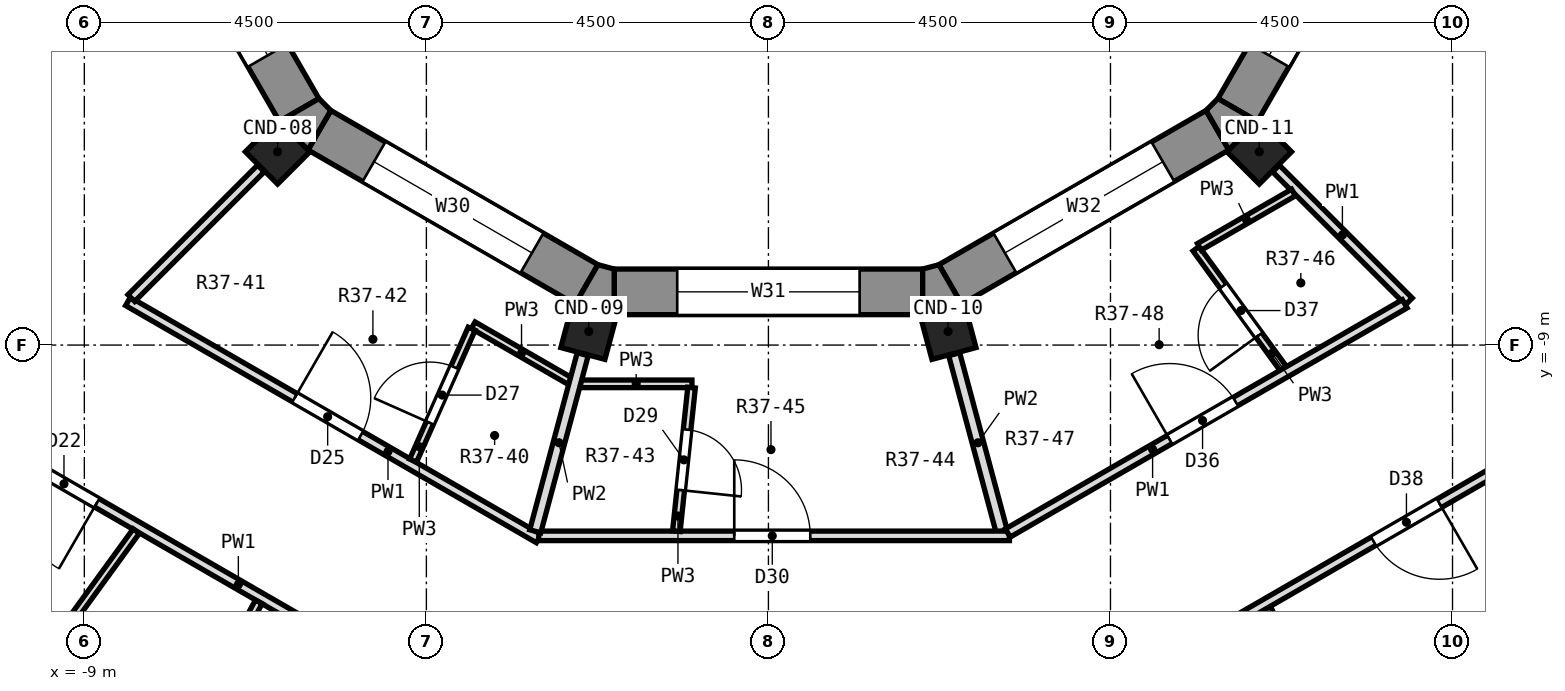
"""IFC4 building model, lengths in metres.
Left out: names, types, materials, properties, quantities, classifications, styles, units other than length and angle.
Written with IfcOpenShell. Run it as: python <this file> out.ifc"""

import sys

from ifc_helpers import new_model, si_unit, direction, frame, frame_2d, origin, origin_2d, place, context, subcontext, project, spatial, polyline, rectangle, outline, extrude, element, fill, save


model = new_model("IFC4")
c1 = context("Model", 3, precision=1e-05, world=origin(), true_north=direction((0.0, 1.0)))
c2 = subcontext(c1, "Body", "Model", "MODEL_VIEW")
j1 = project(units=[si_unit("LENGTHUNIT", "METRE"), si_unit("PLANEANGLEUNIT", "RADIAN")], contexts=[c1])
p1 = place(None, origin())
s1 = spatial("IfcSite", under=j1, at=p1, CompositionType="ELEMENT")
p2 = place(p1, origin())
s2 = spatial("IfcBuilding", under=s1, at=p2, CompositionType="ELEMENT")
p3 = place(p2, frame((0.0, 0.0, 269.3)))
s3 = spatial("IfcBuildingStorey", under=s2, at=p3, CompositionType="ELEMENT", Elevation=269.3)
for number, where, z_axis, x_axis in (
    (1, (-6.458, -6.458, 0.0), (0.0, 0.0, 1.0), (-0.707, -0.707, 0.0)),
    (2, (-2.364, -8.821, 0.0), (0.0, 0.0, 1.0), (-0.259, -0.966, 0.0)),
    (3, (2.364, -8.821, 0.0), (0.0, 0.0, 1.0), (0.259, -0.966, 0.0)),
    (4, (6.458, -6.458, 0.0), (0.0, 0.0, 1.0), (0.707, -0.707, 0.0)),
):
    element("IfcColumn", number, at=place(p3, frame(where, z_axis=z_axis, x_axis=x_axis)), inside=s3, PredefinedType="COLUMN", context=c2, shape_type="SweptSolid", body=[
        extrude(rectangle(XDim=0.6, YDim=0.6, at=origin_2d()), origin(), (0.0, 0.0, 1.0), 3.3),
    ])
p4 = place(p3, frame((-8.203, -2.393, 0.0), z_axis=(0.0, 0.0, 1.0), x_axis=(0.499994954979, -0.866028316509, 0.0)))
e5 = element("IfcWall", 5, at=p4, inside=s3, PredefinedType="SOLIDWALL", context=c2, shape_type="SweptSolid", body=[
    extrude(rectangle(XDim=4.059, YDim=0.6, at=frame_2d((2.029, 0.0))), origin(), (0.0, 0.0, 1.0), 2.9),
])
p5 = place(p4, frame((0.829, 0.0, 0.9)))
e6 = element("IfcOpeningElement", 6, at=p5, cuts=e5, PredefinedType="OPENING", context=c2, shape_type="SweptSolid", body=[
    extrude(rectangle(XDim=2.4, YDim=1.8, at=frame_2d((1.2, 0.9))), frame((0.0, 0.312, 0.0), z_axis=(0.0, -1.0, 0.0), x_axis=(1.0, 0.0, 0.0)), (0.0, 0.0, 1.0), 0.624),
])
p6 = place(p3, frame((-5.907, -6.173, 0.0), z_axis=(0.0, 0.0, 1.0), x_axis=(0.866028316509, -0.499994954979, 0.0)))
e7 = element("IfcWall", 7, at=p6, inside=s3, PredefinedType="SOLIDWALL", context=c2, shape_type="SweptSolid", body=[
    extrude(rectangle(XDim=4.059, YDim=0.6, at=frame_2d((2.029, 0.0))), origin(), (0.0, 0.0, 1.0), 2.9),
])
p7 = place(p6, frame((0.829, 0.0, 0.9)))
e8 = element("IfcOpeningElement", 8, at=p7, cuts=e7, PredefinedType="OPENING", context=c2, shape_type="SweptSolid", body=[
    extrude(rectangle(XDim=2.4, YDim=1.8, at=frame_2d((1.2, 0.9))), frame((0.0, 0.312, 0.0), z_axis=(0.0, -1.0, 0.0), x_axis=(1.0, 0.0, 0.0)), (0.0, 0.0, 1.0), 0.624),
])
p8 = place(p3, frame((-2.029, -8.3, 0.0), z_axis=(0.0, 0.0, 1.0), x_axis=(1.0, 0.0, 0.0)))
e9 = element("IfcWall", 9, at=p8, inside=s3, PredefinedType="SOLIDWALL", context=c2, shape_type="SweptSolid", body=[
    extrude(rectangle(XDim=4.059, YDim=0.6, at=frame_2d((2.029, 0.0))), origin(), (0.0, 0.0, 1.0), 2.9),
])
p9 = place(p8, frame((0.829, 0.0, 0.9)))
e10 = element("IfcOpeningElement", 10, at=p9, cuts=e9, PredefinedType="OPENING", context=c2, shape_type="SweptSolid", body=[
    extrude(rectangle(XDim=2.4, YDim=1.8, at=frame_2d((1.2, 0.9))), frame((0.0, 0.312, 0.0), z_axis=(0.0, -1.0, 0.0), x_axis=(1.0, 0.0, 0.0)), (0.0, 0.0, 1.0), 0.624),
])
p10 = place(p3, frame((2.393, -8.203, 0.0), z_axis=(0.0, 0.0, 1.0), x_axis=(0.866028316509, 0.499994954979, 0.0)))
e11 = element("IfcWall", 11, at=p10, inside=s3, PredefinedType="SOLIDWALL", context=c2, shape_type="SweptSolid", body=[
    extrude(rectangle(XDim=4.059, YDim=0.6, at=frame_2d((2.029, 0.0))), origin(), (0.0, 0.0, 1.0), 2.9),
])
p11 = place(p10, frame((0.829, 0.0, 0.9)))
e12 = element("IfcOpeningElement", 12, at=p11, cuts=e11, PredefinedType="OPENING", context=c2, shape_type="SweptSolid", body=[
    extrude(rectangle(XDim=2.4, YDim=1.8, at=frame_2d((1.2, 0.9))), frame((0.0, 0.312, 0.0), z_axis=(0.0, -1.0, 0.0), x_axis=(1.0, 0.0, 0.0)), (0.0, 0.0, 1.0), 0.624),
])
p12 = place(p3, frame((6.173, -5.907, 0.0), z_axis=(0.0, 0.0, 1.0), x_axis=(0.499994954979, 0.866028316509, 0.0)))
e13 = element("IfcWall", 13, at=p12, inside=s3, PredefinedType="SOLIDWALL", context=c2, shape_type="SweptSolid", body=[
    extrude(rectangle(XDim=4.059, YDim=0.6, at=frame_2d((2.029, 0.0))), origin(), (0.0, 0.0, 1.0), 2.9),
])
p13 = place(p12, frame((0.829, 0.0, 0.9)))
e14 = element("IfcOpeningElement", 14, at=p13, cuts=e13, PredefinedType="OPENING", context=c2, shape_type="SweptSolid", body=[
    extrude(rectangle(XDim=2.4, YDim=1.8, at=frame_2d((1.2, 0.9))), frame((0.0, 0.312, 0.0), z_axis=(0.0, -1.0, 0.0), x_axis=(1.0, 0.0, 0.0)), (0.0, 0.0, 1.0), 0.624),
])
p14 = place(p3, origin())
e15 = element("IfcWall", 15, at=p14, inside=s3, PredefinedType="SOLIDWALL", context=c2, shape_type="SweptSolid", body=[
    extrude(outline(polyline([(-6.058, -6.433), (-5.758, -5.914), (-5.914, -5.758), (-6.433, -6.058), (-6.058, -6.433)])), origin(), (0.0, 0.0, 1.0), 2.9),
])
p15 = place(p3, origin())
e16 = element("IfcWall", 16, at=p15, inside=s3, PredefinedType="SOLIDWALL", context=c2, shape_type="SweptSolid", body=[
    extrude(outline(polyline([(-2.029, -8.6), (-2.029, -8.0), (-2.242, -7.943), (-2.542, -8.462), (-2.029, -8.6)])), origin(), (0.0, 0.0, 1.0), 2.9),
])
p16 = place(p3, origin())
e17 = element("IfcWall", 17, at=p16, inside=s3, PredefinedType="SOLIDWALL", context=c2, shape_type="SweptSolid", body=[
    extrude(outline(polyline([(2.542, -8.462), (2.242, -7.943), (2.029, -8.0), (2.029, -8.6), (2.542, -8.462)])), origin(), (0.0, 0.0, 1.0), 2.9),
])
p17 = place(p3, origin())
e18 = element("IfcWall", 18, at=p17, inside=s3, PredefinedType="SOLIDWALL", context=c2, shape_type="SweptSolid", body=[
    extrude(outline(polyline([(6.433, -6.058), (5.914, -5.758), (5.758, -5.914), (6.058, -6.433), (6.433, -6.058)])), origin(), (0.0, 0.0, 1.0), 2.9),
])
p18 = place(p3, frame((2.444, -9.12, 0.0), z_axis=(0.0, 0.0, 1.0), x_axis=(0.258891282715, -0.965906467384, 0.0)))
e19 = element("IfcWall", 19, at=p18, inside=s3, PredefinedType="PARTITIONING", context=c2, shape_type="SweptSolid", body=[
    extrude(rectangle(XDim=2.411, YDim=0.15, at=frame_2d((1.206, 0.0))), origin(), (0.0, 0.0, 1.0), 2.9),
])
p19 = place(p3, frame((6.559, -12.462, 0.0), z_axis=(0.0, 0.0, 1.0), x_axis=(0.465716796336, -0.884933819904, 0.0)))
e20 = element("IfcWall", 20, at=p19, inside=s3, PredefinedType="PARTITIONING", context=c2, shape_type="SweptSolid", body=[
    extrude(rectangle(XDim=2.037, YDim=0.1, at=frame_2d((1.019, 0.0))), origin(), (0.0, 0.0, 1.0), 2.9),
])
p20 = place(p3, frame((5.626, -7.733, 0.0), z_axis=(0.0, 0.0, 1.0), x_axis=(0.588655753786, -0.808383821915, 0.0)))
e21 = element("IfcWall", 21, at=p20, inside=s3, PredefinedType="PARTITIONING", context=c2, shape_type="SweptSolid", body=[
    extrude(rectangle(XDim=1.949, YDim=0.1, at=frame_2d((0.975, 0.0))), origin(), (0.0, 0.0, 1.0), 2.9),
])
p21 = place(p20, frame((0.606, 0.0, 0.0)))
e22 = element("IfcOpeningElement", 22, at=p21, cuts=e21, PredefinedType="OPENING", context=c2, shape_type="SweptSolid", body=[
    extrude(rectangle(XDim=0.8, YDim=2.1, at=frame_2d((0.4, 1.05))), frame((0.0, 0.062, 0.0), z_axis=(0.0, -1.0, 0.0), x_axis=(1.0, 0.0, 0.0)), (0.0, 0.0, 1.0), 0.124),
])
p22 = place(p3, frame((6.677, -6.677, 0.0), z_axis=(0.0, 0.0, 1.0), x_axis=(0.707106781187, -0.707106781187, 0.0)))
e23 = element("IfcWall", 23, at=p22, inside=s3, PredefinedType="PARTITIONING", context=c2, shape_type="SweptSolid", body=[
    extrude(rectangle(XDim=2.474, YDim=0.125, at=frame_2d((1.237, 0.0))), origin(), (0.0, 0.0, 1.0), 2.9),
])
p23 = place(p3, frame((-10.256, -10.256, 0.0), z_axis=(0.0, 0.0, 1.0), x_axis=(0.866032740159, -0.499987292811, 0.0)))
e24 = element("IfcWall", 24, at=p23, inside=s3, PredefinedType="PARTITIONING", context=c2, shape_type="SweptSolid", body=[
    extrude(rectangle(XDim=7.581, YDim=0.125, at=frame_2d((3.791, 0.0))), origin(), (0.0, 0.0, 1.0), 2.9),
])
p24 = place(p23, frame((0.641, 0.0, 0.0)))
e25 = element("IfcOpeningElement", 25, at=p24, cuts=e24, PredefinedType="OPENING", context=c2, shape_type="SweptSolid", body=[
    extrude(rectangle(XDim=1.0, YDim=2.1, at=frame_2d((0.5, 1.05))), frame((0.0, 0.074, 0.0), z_axis=(0.0, -1.0, 0.0), x_axis=(1.0, 0.0, 0.0)), (0.0, 0.0, 1.0), 0.149),
])
p25 = place(p3, frame((-8.426, -8.426, 0.0), z_axis=(0.0, 0.0, 1.0), x_axis=(0.866039004929, -0.499976441387, 0.0)))
e26 = element("IfcWall", 26, at=p25, inside=s3, PredefinedType="PARTITIONING", context=c2, shape_type="SweptSolid", body=[
    extrude(rectangle(XDim=6.24, YDim=0.125, at=frame_2d((3.12, 0.0))), origin(), (0.0, 0.0, 1.0), 2.9),
])
p26 = place(p25, frame((2.534, 0.0, 0.0)))
e27 = element("IfcOpeningElement", 27, at=p26, cuts=e26, PredefinedType="OPENING", context=c2, shape_type="SweptSolid", body=[
    extrude(rectangle(XDim=1.0, YDim=2.1, at=frame_2d((0.5, 1.05))), frame((0.0, 0.074, 0.0), z_axis=(0.0, -1.0, 0.0), x_axis=(1.0, 0.0, 0.0)), (0.0, 0.0, 1.0), 0.149),
])
p27 = place(p3, frame((-3.884, -8.739, 0.0), z_axis=(0.0, 0.0, 1.0), x_axis=(0.866146805758, -0.499789666634, 0.0)))
e28 = element("IfcWall", 28, at=p27, inside=s3, PredefinedType="PARTITIONING", context=c2, shape_type="SweptSolid", body=[
    extrude(rectangle(XDim=1.468, YDim=0.1, at=frame_2d((0.734, 0.0))), origin(), (0.0, 0.0, 1.0), 2.9),
])
p28 = place(p3, frame((-3.021, -11.51, 0.0), z_axis=(0.0, 0.0, 1.0), x_axis=(1.0, 0.0, 0.0)))
e29 = element("IfcWall", 29, at=p28, inside=s3, PredefinedType="PARTITIONING", context=c2, shape_type="SweptSolid", body=[
    extrude(rectangle(XDim=6.192, YDim=0.125, at=frame_2d((3.096, 0.0))), origin(), (0.0, 0.0, 1.0), 2.9),
])
p29 = place(p28, frame((2.572, 0.0, 0.0)))
e30 = element("IfcOpeningElement", 30, at=p29, cuts=e29, PredefinedType="OPENING", context=c2, shape_type="SweptSolid", body=[
    extrude(rectangle(XDim=1.0, YDim=2.1, at=frame_2d((0.5, 1.05))), frame((0.0, 0.074, 0.0), z_axis=(0.0, -1.0, 0.0), x_axis=(1.0, 0.0, 0.0)), (0.0, 0.0, 1.0), 0.149),
])
p30 = place(p3, frame((-2.473, -9.51, 0.0), z_axis=(0.0, 0.0, 1.0), x_axis=(1.0, 0.0, 0.0)))
e31 = element("IfcWall", 31, at=p30, inside=s3, PredefinedType="PARTITIONING", context=c2, shape_type="SweptSolid", body=[
    extrude(rectangle(XDim=1.467, YDim=0.1, at=frame_2d((0.733, 0.0))), origin(), (0.0, 0.0, 1.0), 2.9),
])
p31 = place(p3, frame((3.808, -13.979, 0.0), z_axis=(0.0, 0.0, 1.0), x_axis=(0.866028642731, 0.499994389938, 0.0)))
e32 = element("IfcWall", 32, at=p31, inside=s3, PredefinedType="PARTITIONING", context=c2, shape_type="SweptSolid", body=[
    extrude(rectangle(XDim=7.383, YDim=0.125, at=frame_2d((3.691, 0.0))), origin(), (0.0, 0.0, 1.0), 2.9),
])
p32 = place(p31, frame((4.795, 0.0, 0.0)))
e33 = element("IfcOpeningElement", 33, at=p32, cuts=e32, PredefinedType="OPENING", context=c2, shape_type="SweptSolid", body=[
    extrude(rectangle(XDim=1.0, YDim=2.1, at=frame_2d((0.5, 1.05))), frame((0.0, 0.074, 0.0), z_axis=(0.0, -1.0, 0.0), x_axis=(1.0, 0.0, 0.0)), (0.0, 0.0, 1.0), 0.149),
])
p33 = place(p3, frame((3.149, -11.472, 0.0), z_axis=(0.0, 0.0, 1.0), x_axis=(0.866047390407, 0.499961916119, 0.0)))
e34 = element("IfcWall", 34, at=p33, inside=s3, PredefinedType="PARTITIONING", context=c2, shape_type="SweptSolid", body=[
    extrude(rectangle(XDim=6.031, YDim=0.125, at=frame_2d((3.015, 0.0))), origin(), (0.0, 0.0, 1.0), 2.9),
])
p34 = place(p33, frame((2.459, 0.0, 0.0)))
e35 = element("IfcOpeningElement", 35, at=p34, cuts=e34, PredefinedType="OPENING", context=c2, shape_type="SweptSolid", body=[
    extrude(rectangle(XDim=1.0, YDim=2.1, at=frame_2d((0.5, 1.05))), frame((0.0, 0.074, 0.0), z_axis=(0.0, -1.0, 0.0), x_axis=(1.0, 0.0, 0.0)), (0.0, 0.0, 1.0), 0.149),
])
p35 = place(p3, frame((5.669, -7.708, 0.0), z_axis=(0.0, 0.0, 1.0), x_axis=(0.866134428192, 0.499811116623, 0.0)))
e36 = element("IfcWall", 36, at=p35, inside=s3, PredefinedType="PARTITIONING", context=c2, shape_type="SweptSolid", body=[
    extrude(rectangle(XDim=1.43, YDim=0.1, at=frame_2d((0.715, 0.0))), origin(), (0.0, 0.0, 1.0), 2.9),
])
p36 = place(p3, frame((-8.382, -8.382, 0.0), z_axis=(0.0, 0.0, 1.0), x_axis=(0.707106781187, 0.707106781187, 0.0)))
e37 = element("IfcWall", 37, at=p36, inside=s3, PredefinedType="PARTITIONING", context=c2, shape_type="SweptSolid", body=[
    extrude(rectangle(XDim=2.411, YDim=0.125, at=frame_2d((1.206, 0.0))), origin(), (0.0, 0.0, 1.0), 2.9),
])
p37 = place(p3, frame((-9.492, -13.064, 0.0), z_axis=(0.0, 0.0, 1.0), x_axis=(0.587873893167, 0.80895258559, 0.0)))
e38 = element("IfcWall", 38, at=p37, inside=s3, PredefinedType="PARTITIONING", context=c2, shape_type="SweptSolid", body=[
    extrude(rectangle(XDim=1.999, YDim=0.1, at=frame_2d((1.0, 0.0))), origin(), (0.0, 0.0, 1.0), 2.9),
])
p38 = place(p3, frame((-7.652, -14.127, 0.0), z_axis=(0.0, 0.0, 1.0), x_axis=(0.476243596433, 0.879313389444, 0.0)))
e39 = element("IfcWall", 39, at=p38, inside=s3, PredefinedType="PARTITIONING", context=c2, shape_type="SweptSolid", body=[
    extrude(rectangle(XDim=1.989, YDim=0.1, at=frame_2d((0.994, 0.0))), origin(), (0.0, 0.0, 1.0), 2.9),
])
p39 = place(p3, frame((-4.675, -10.52, 0.0), z_axis=(0.0, 0.0, 1.0), x_axis=(0.40574466239, 0.913986470875, 0.0)))
e40 = element("IfcWall", 40, at=p39, inside=s3, PredefinedType="PARTITIONING", context=c2, shape_type="SweptSolid", body=[
    extrude(rectangle(XDim=1.898, YDim=0.1, at=frame_2d((0.949, 0.0))), origin(), (0.0, 0.0, 1.0), 2.9),
])
p40 = place(p39, frame((0.543, 0.0, 0.0)))
e41 = element("IfcOpeningElement", 41, at=p40, cuts=e40, PredefinedType="OPENING", context=c2, shape_type="SweptSolid", body=[
    extrude(rectangle(XDim=0.8, YDim=2.1, at=frame_2d((0.4, 1.05))), frame((0.0, 0.062, 0.0), z_axis=(0.0, -1.0, 0.0), x_axis=(1.0, 0.0, 0.0)), (0.0, 0.0, 1.0), 0.124),
])
p41 = place(p3, frame((-3.068, -11.45, 0.0), z_axis=(0.0, 0.0, 1.0), x_axis=(0.258796817064, 0.965931782, 0.0)))
e42 = element("IfcWall", 42, at=p41, inside=s3, PredefinedType="PARTITIONING", context=c2, shape_type="SweptSolid", body=[
    extrude(rectangle(XDim=2.411, YDim=0.15, at=frame_2d((1.206, 0.0))), origin(), (0.0, 0.0, 1.0), 2.9),
])
p42 = place(p3, frame((-1.211, -11.448, 0.0), z_axis=(0.0, 0.0, 1.0), x_axis=(0.105447867905, 0.99442483233, 0.0)))
e43 = element("IfcWall", 43, at=p42, inside=s3, PredefinedType="PARTITIONING", context=c2, shape_type="SweptSolid", body=[
    extrude(rectangle(XDim=1.898, YDim=0.1, at=frame_2d((0.949, 0.0))), origin(), (0.0, 0.0, 1.0), 2.9),
])
p43 = place(p42, frame((0.543, 0.0, 0.0)))
e44 = element("IfcOpeningElement", 44, at=p43, cuts=e43, PredefinedType="OPENING", context=c2, shape_type="SweptSolid", body=[
    extrude(rectangle(XDim=0.8, YDim=2.1, at=frame_2d((0.4, 1.05))), frame((0.0, 0.062, 0.0), z_axis=(0.0, -1.0, 0.0), x_axis=(1.0, 0.0, 0.0)), (0.0, 0.0, 1.0), 0.124),
])
p44 = place(p5, origin())
e45 = element("IfcWindow", 45, at=p44, inside=s3, PartitioningType="SINGLE_PANEL", PredefinedType="WINDOW", context=c2, shape_type="SweptSolid", body=[
    extrude(rectangle(XDim=2.4, YDim=1.8, at=frame_2d((1.2, 0.9))), frame((0.0, -0.12, 0.0), z_axis=(0.0, -1.0, 0.0), x_axis=(1.0, 0.0, 0.0)), (0.0, 0.0, 1.0), 0.06),
])
fill(e6, e45)
p45 = place(p7, origin())
e46 = element("IfcWindow", 46, at=p45, inside=s3, PartitioningType="SINGLE_PANEL", PredefinedType="WINDOW", context=c2, shape_type="SweptSolid", body=[
    extrude(rectangle(XDim=2.4, YDim=1.8, at=frame_2d((1.2, 0.9))), frame((0.0, -0.12, 0.0), z_axis=(0.0, -1.0, 0.0), x_axis=(1.0, 0.0, 0.0)), (0.0, 0.0, 1.0), 0.06),
])
fill(e8, e46)
p46 = place(p9, origin())
e47 = element("IfcWindow", 47, at=p46, inside=s3, PartitioningType="SINGLE_PANEL", PredefinedType="WINDOW", context=c2, shape_type="SweptSolid", body=[
    extrude(rectangle(XDim=2.4, YDim=1.8, at=frame_2d((1.2, 0.9))), frame((0.0, -0.12, 0.0), z_axis=(0.0, -1.0, 0.0), x_axis=(1.0, 0.0, 0.0)), (0.0, 0.0, 1.0), 0.06),
])
fill(e10, e47)
p47 = place(p11, origin())
e48 = element("IfcWindow", 48, at=p47, inside=s3, PartitioningType="SINGLE_PANEL", PredefinedType="WINDOW", context=c2, shape_type="SweptSolid", body=[
    extrude(rectangle(XDim=2.4, YDim=1.8, at=frame_2d((1.2, 0.9))), frame((0.0, -0.12, 0.0), z_axis=(0.0, -1.0, 0.0), x_axis=(1.0, 0.0, 0.0)), (0.0, 0.0, 1.0), 0.06),
])
fill(e12, e48)
p48 = place(p13, origin())
e49 = element("IfcWindow", 49, at=p48, inside=s3, PartitioningType="SINGLE_PANEL", PredefinedType="WINDOW", context=c2, shape_type="SweptSolid", body=[
    extrude(rectangle(XDim=2.4, YDim=1.8, at=frame_2d((1.2, 0.9))), frame((0.0, -0.12, 0.0), z_axis=(0.0, -1.0, 0.0), x_axis=(1.0, 0.0, 0.0)), (0.0, 0.0, 1.0), 0.06),
])
fill(e14, e49)
p49 = place(p24, frame((1.0, 0.0, 0.0), z_axis=(0.0, 0.0, 1.0), x_axis=(-1.0, 0.0, 0.0)))
e50 = element("IfcDoor", 50, at=p49, inside=s3, OperationType="SINGLE_SWING_LEFT", PredefinedType="DOOR", context=c2, shape_type="SweptSolid", body=[
    extrude(rectangle(XDim=1.0, YDim=2.1, at=frame_2d((0.5, 1.05))), frame((0.0, 0.025, 0.0), z_axis=(0.0, -1.0, 0.0), x_axis=(1.0, 0.0, 0.0)), (0.0, 0.0, 1.0), 0.05),
])
fill(e25, e50)
p50 = place(p26, origin())
e51 = element("IfcDoor", 51, at=p50, inside=s3, OperationType="SINGLE_SWING_LEFT", PredefinedType="DOOR", context=c2, shape_type="SweptSolid", body=[
    extrude(rectangle(XDim=1.0, YDim=2.1, at=frame_2d((0.5, 1.05))), frame((0.0, 0.025, 0.0), z_axis=(0.0, -1.0, 0.0), x_axis=(1.0, 0.0, 0.0)), (0.0, 0.0, 1.0), 0.05),
])
fill(e27, e51)
p51 = place(p40, origin())
e52 = element("IfcDoor", 52, at=p51, inside=s3, OperationType="SINGLE_SWING_LEFT", PredefinedType="DOOR", context=c2, shape_type="SweptSolid", body=[
    extrude(rectangle(XDim=0.8, YDim=2.1, at=frame_2d((0.4, 1.05))), frame((0.0, 0.025, 0.0), z_axis=(0.0, -1.0, 0.0), x_axis=(1.0, 0.0, 0.0)), (0.0, 0.0, 1.0), 0.05),
])
fill(e41, e52)
p52 = place(p43, frame((0.8, 0.0, 0.0), z_axis=(0.0, 0.0, 1.0), x_axis=(-1.0, 0.0, 0.0)))
e53 = element("IfcDoor", 53, at=p52, inside=s3, OperationType="SINGLE_SWING_RIGHT", PredefinedType="DOOR", context=c2, shape_type="SweptSolid", body=[
    extrude(rectangle(XDim=0.8, YDim=2.1, at=frame_2d((0.4, 1.05))), frame((0.0, 0.025, 0.0), z_axis=(0.0, -1.0, 0.0), x_axis=(1.0, 0.0, 0.0)), (0.0, 0.0, 1.0), 0.05),
])
fill(e44, e53)
p53 = place(p29, origin())
e54 = element("IfcDoor", 54, at=p53, inside=s3, OperationType="SINGLE_SWING_LEFT", PredefinedType="DOOR", context=c2, shape_type="SweptSolid", body=[
    extrude(rectangle(XDim=1.0, YDim=2.1, at=frame_2d((0.5, 1.05))), frame((0.0, 0.025, 0.0), z_axis=(0.0, -1.0, 0.0), x_axis=(1.0, 0.0, 0.0)), (0.0, 0.0, 1.0), 0.05),
])
fill(e30, e54)
p54 = place(p34, origin())
e55 = element("IfcDoor", 55, at=p54, inside=s3, OperationType="SINGLE_SWING_LEFT", PredefinedType="DOOR", context=c2, shape_type="SweptSolid", body=[
    extrude(rectangle(XDim=1.0, YDim=2.1, at=frame_2d((0.5, 1.05))), frame((0.0, 0.025, 0.0), z_axis=(0.0, -1.0, 0.0), x_axis=(1.0, 0.0, 0.0)), (0.0, 0.0, 1.0), 0.05),
])
fill(e35, e55)
p55 = place(p21, frame((0.8, 0.0, 0.0), z_axis=(0.0, 0.0, 1.0), x_axis=(-1.0, 0.0, 0.0)))
e56 = element("IfcDoor", 56, at=p55, inside=s3, OperationType="SINGLE_SWING_LEFT", PredefinedType="DOOR", context=c2, shape_type="SweptSolid", body=[
    extrude(rectangle(XDim=0.8, YDim=2.1, at=frame_2d((0.4, 1.05))), frame((0.0, 0.025, 0.0), z_axis=(0.0, -1.0, 0.0), x_axis=(1.0, 0.0, 0.0)), (0.0, 0.0, 1.0), 0.05),
])
fill(e22, e56)
p56 = place(p32, frame((1.0, 0.0, 0.0), z_axis=(0.0, 0.0, 1.0), x_axis=(-1.0, 0.0, 0.0)))
e57 = element("IfcDoor", 57, at=p56, inside=s3, OperationType="SINGLE_SWING_LEFT", PredefinedType="DOOR", context=c2, shape_type="SweptSolid", body=[
    extrude(rectangle(XDim=1.0, YDim=2.1, at=frame_2d((0.5, 1.05))), frame((0.0, 0.025, 0.0), z_axis=(0.0, -1.0, 0.0), x_axis=(1.0, 0.0, 0.0)), (0.0, 0.0, 1.0), 0.05),
])
fill(e33, e57)
save(model, sys.argv[1])
